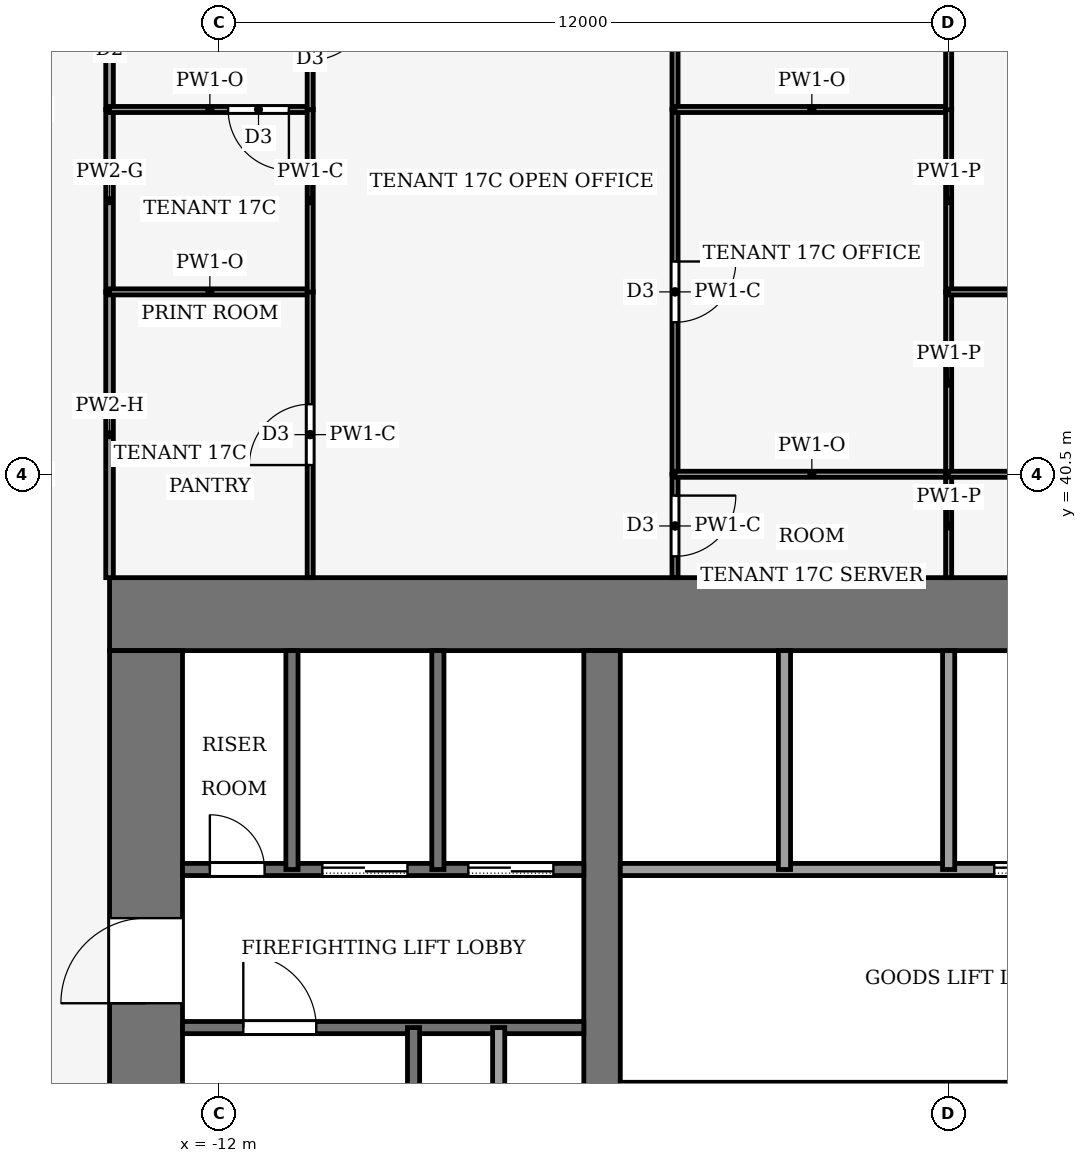
"""IFC4 building model, lengths in metres.
Left out: names, types, materials, properties, quantities, classifications, styles, units other than length and angle.
Written with IfcOpenShell. Run it as: python <this file> out.ifc"""

import sys

from ifc_helpers import new_model, si_unit, direction, frame, frame_2d, origin, place, context, subcontext, project, spatial, rectangle, extrude, element, fill, save


model = new_model("IFC4")
c1 = context("Model", 3, precision=1e-05, world=origin(), true_north=direction((0.0, 1.0)))
c2 = subcontext(c1, "Body", "Model", "MODEL_VIEW")
j1 = project(units=[si_unit("LENGTHUNIT", "METRE"), si_unit("PLANEANGLEUNIT", "RADIAN")], contexts=[c1])
p1 = place(None, origin())
s1 = spatial("IfcSite", under=j1, at=p1, CompositionType="ELEMENT")
p2 = place(p1, origin())
s2 = spatial("IfcBuilding", under=s1, at=p2, CompositionType="ELEMENT")
p3 = place(p2, frame((0.0, 0.0, 78.0)))
s3 = spatial("IfcBuildingStorey", under=s2, at=p3, CompositionType="ELEMENT", Elevation=78.0)
p4 = place(p3, frame((-13.8, 38.2, -0.13), z_axis=(0.0, 0.0, 1.0), x_axis=(1.0, 0.0, 0.0)))
e1 = element("IfcWall", 1, at=p4, inside=s3, PredefinedType="SHEAR", context=c2, shape_type="SweptSolid", body=[
    extrude(rectangle(XDim=27.6, YDim=1.2, at=frame_2d((13.8, 0.0))), origin(), (0.0, 0.0, 1.0), 4.0),
])
p5 = place(p3, frame((-13.2, 18.4, -0.13), z_axis=(0.0, 0.0, 1.0), x_axis=(0.0, 1.0, 0.0)))
e2 = element("IfcWall", 2, at=p5, inside=s3, PredefinedType="SHEAR", context=c2, shape_type="SweptSolid", body=[
    extrude(rectangle(XDim=19.2, YDim=1.2, at=frame_2d((9.6, 0.0))), origin(), (0.0, 0.0, 1.0), 4.0),
])
p6 = place(p5, frame((2.8, 0.0, 0.13)))
e3 = element("IfcOpeningElement", 3, at=p6, cuts=e2, PredefinedType="OPENING", context=c2, shape_type="SweptSolid", body=[
    extrude(rectangle(XDim=2.4, YDim=2.4, at=frame_2d((1.2, 1.2))), frame((0.0, 0.61, 0.0), z_axis=(0.0, -1.0, 0.0), x_axis=(1.0, 0.0, 0.0)), (0.0, 0.0, 1.0), 1.22),
])
p7 = place(p5, frame((13.4, 0.0, 0.13)))
e4 = element("IfcOpeningElement", 4, at=p7, cuts=e2, PredefinedType="OPENING", context=c2, shape_type="SweptSolid", body=[
    extrude(rectangle(XDim=1.4, YDim=2.2, at=frame_2d((0.7, 1.1))), frame((0.0, 0.61, 0.0), z_axis=(0.0, -1.0, 0.0), x_axis=(1.0, 0.0, 0.0)), (0.0, 0.0, 1.0), 1.22),
])
p8 = place(p3, frame((-5.7, 18.4, -0.13), z_axis=(0.0, 0.0, 1.0), x_axis=(0.0, 1.0, 0.0)))
e5 = element("IfcWall", 5, at=p8, inside=s3, PredefinedType="SHEAR", context=c2, shape_type="SweptSolid", body=[
    extrude(rectangle(XDim=19.2, YDim=0.6, at=frame_2d((9.6, 0.0))), origin(), (0.0, 0.0, 1.0), 4.0),
])
p9 = place(p8, frame((8.35, 0.0, 0.13)))
e6 = element("IfcOpeningElement", 6, at=p9, cuts=e5, PredefinedType="OPENING", context=c2, shape_type="SweptSolid", body=[
    extrude(rectangle(XDim=0.9, YDim=2.1, at=frame_2d((0.45, 1.05))), frame((0.0, 0.31, 0.0), z_axis=(0.0, -1.0, 0.0), x_axis=(1.0, 0.0, 0.0)), (0.0, 0.0, 1.0), 0.62),
])
p10 = place(p3, frame((-12.6, 31.4, 0.0), z_axis=(0.0, 0.0, 1.0), x_axis=(1.0, 0.0, 0.0)))
e7 = element("IfcWall", 7, at=p10, inside=s3, PredefinedType="PARTITIONING", context=c2, shape_type="SweptSolid", body=[
    extrude(rectangle(XDim=6.6, YDim=0.2, at=frame_2d((3.3, 0.0))), origin(), (0.0, 0.0, 1.0), 3.87),
])
p11 = place(p10, frame((1.0, 0.0, 0.0)))
e8 = element("IfcOpeningElement", 8, at=p11, cuts=e7, PredefinedType="OPENING", context=c2, shape_type="SweptSolid", body=[
    extrude(rectangle(XDim=1.2, YDim=2.2, at=frame_2d((0.6, 1.1))), frame((0.0, 0.11, 0.0), z_axis=(0.0, -1.0, 0.0), x_axis=(1.0, 0.0, 0.0)), (0.0, 0.0, 1.0), 0.22),
])
p12 = place(p3, frame((-12.6, 34.0, 0.0), z_axis=(0.0, 0.0, 1.0), x_axis=(1.0, 0.0, 0.0)))
e9 = element("IfcWall", 9, at=p12, inside=s3, PredefinedType="PARTITIONING", context=c2, shape_type="SweptSolid", body=[
    extrude(rectangle(XDim=6.6, YDim=0.2, at=frame_2d((3.3, 0.0))), origin(), (0.0, 0.0, 1.0), 3.87),
])
p13 = place(p12, frame((4.7, 0.0, 0.0)))
e10 = element("IfcOpeningElement", 10, at=p13, cuts=e9, PredefinedType="OPENING", context=c2, shape_type="SweptSolid", body=[
    extrude(rectangle(XDim=1.4, YDim=2.2, at=frame_2d((0.7, 1.1))), frame((0.0, 0.11, 0.0), z_axis=(0.0, -1.0, 0.0), x_axis=(1.0, 0.0, 0.0)), (0.0, 0.0, 1.0), 0.22),
])
p14 = place(p12, frame((2.3, 0.0, 0.0)))
e11 = element("IfcOpeningElement", 11, at=p14, cuts=e9, PredefinedType="OPENING", context=c2, shape_type="SweptSolid", body=[
    extrude(rectangle(XDim=1.4, YDim=2.2, at=frame_2d((0.7, 1.1))), frame((0.0, 0.11, 0.0), z_axis=(0.0, -1.0, 0.0), x_axis=(1.0, 0.0, 0.0)), (0.0, 0.0, 1.0), 0.22),
])
p15 = place(p12, frame((0.45, 0.0, 0.0)))
e12 = element("IfcOpeningElement", 12, at=p15, cuts=e9, PredefinedType="OPENING", context=c2, shape_type="SweptSolid", body=[
    extrude(rectangle(XDim=0.9, YDim=2.1, at=frame_2d((0.45, 1.05))), frame((0.0, 0.11, 0.0), z_axis=(0.0, -1.0, 0.0), x_axis=(1.0, 0.0, 0.0)), (0.0, 0.0, 1.0), 0.22),
])
p16 = place(p3, frame((-5.4, 34.0, 0.0), z_axis=(0.0, 0.0, 1.0), x_axis=(1.0, 0.0, 0.0)))
e13 = element("IfcWall", 13, at=p16, inside=s3, PredefinedType="PARTITIONING", context=c2, shape_type="SweptSolid", body=[
    extrude(rectangle(XDim=10.8, YDim=0.2, at=frame_2d((5.4, 0.0))), origin(), (0.0, 0.0, 1.0), 3.87),
])
p17 = place(p16, frame((6.15, 0.0, 0.0)))
e14 = element("IfcOpeningElement", 14, at=p17, cuts=e13, PredefinedType="OPENING", context=c2, shape_type="SweptSolid", body=[
    extrude(rectangle(XDim=1.2, YDim=2.2, at=frame_2d((0.6, 1.1))), frame((0.0, 0.11, 0.0), z_axis=(0.0, -1.0, 0.0), x_axis=(1.0, 0.0, 0.0)), (0.0, 0.0, 1.0), 0.22),
])
p18 = place(p16, frame((8.95, 0.0, 0.0)))
e15 = element("IfcOpeningElement", 15, at=p18, cuts=e13, PredefinedType="OPENING", context=c2, shape_type="SweptSolid", body=[
    extrude(rectangle(XDim=1.0, YDim=2.1, at=frame_2d((0.5, 1.05))), frame((0.0, 0.11, 0.0), z_axis=(0.0, -1.0, 0.0), x_axis=(1.0, 0.0, 0.0)), (0.0, 0.0, 1.0), 0.22),
])
p19 = place(p3, frame((-10.8, 34.0, 0.0), z_axis=(0.0, 0.0, 1.0), x_axis=(0.0, 1.0, 0.0)))
e16 = element("IfcWall", 16, at=p19, inside=s3, PredefinedType="PARTITIONING", context=c2, shape_type="SweptSolid", body=[
    extrude(rectangle(XDim=3.6, YDim=0.2, at=frame_2d((1.8, 0.0))), origin(), (0.0, 0.0, 1.0), 3.87),
])
p20 = place(p3, frame((-8.8, 24.0, 0.0), z_axis=(0.0, 0.0, 1.0), x_axis=(0.0, 1.0, 0.0)))
e17 = element("IfcWall", 17, at=p20, inside=s3, PredefinedType="PARTITIONING", context=c2, shape_type="SweptSolid", body=[
    extrude(rectangle(XDim=7.4, YDim=0.2, at=frame_2d((3.7, 0.0))), origin(), (0.0, 0.0, 1.0), 3.87),
])
p21 = place(p3, frame((-8.4, 34.0, 0.0), z_axis=(0.0, 0.0, 1.0), x_axis=(0.0, 1.0, 0.0)))
e18 = element("IfcWall", 18, at=p21, inside=s3, PredefinedType="PARTITIONING", context=c2, shape_type="SweptSolid", body=[
    extrude(rectangle(XDim=3.6, YDim=0.2, at=frame_2d((1.8, 0.0))), origin(), (0.0, 0.0, 1.0), 3.87),
])
p22 = place(p3, frame((-7.4, 24.0, 0.0), z_axis=(0.0, 0.0, 1.0), x_axis=(0.0, 1.0, 0.0)))
e19 = element("IfcWall", 19, at=p22, inside=s3, PredefinedType="PARTITIONING", context=c2, shape_type="SweptSolid", body=[
    extrude(rectangle(XDim=7.4, YDim=0.2, at=frame_2d((3.7, 0.0))), origin(), (0.0, 0.0, 1.0), 3.87),
])
for number, where, z_axis, x_axis in (
    (20, (-2.7, 34.0, 0.0), (0.0, 0.0, 1.0), (0.0, 1.0, 0.0)),
    (21, (0.0, 34.0, 0.0), (0.0, 0.0, 1.0), (0.0, 1.0, 0.0)),
):
    element("IfcWall", number, at=place(p3, frame(where, z_axis=z_axis, x_axis=x_axis)), inside=s3, PredefinedType="PARTITIONING", context=c2, shape_type="SweptSolid", body=[
        extrude(rectangle(XDim=3.6, YDim=0.2, at=frame_2d((1.8, 0.0))), origin(), (0.0, 0.0, 1.0), 3.87),
    ])
p23 = place(p3, frame((-13.8, 38.8, 0.0), z_axis=(0.0, 0.0, 1.0), x_axis=(0.0, 1.0, 0.0)))
e22 = element("IfcWall", 22, at=p23, inside=s3, PredefinedType="PARTITIONING", context=c2, shape_type="SweptSolid", body=[
    extrude(rectangle(XDim=4.7, YDim=0.125, at=frame_2d((2.35, 0.0))), origin(), (0.0, 0.0, 1.0), 3.14),
])
p24 = place(p3, frame((-13.8, 43.5, 0.0), z_axis=(0.0, 0.0, 1.0), x_axis=(0.0, 1.0, 0.0)))
e23 = element("IfcWall", 23, at=p24, inside=s3, PredefinedType="PARTITIONING", context=c2, shape_type="SweptSolid", body=[
    extrude(rectangle(XDim=3.0, YDim=0.125, at=frame_2d((1.5, 0.0))), origin(), (0.0, 0.0, 1.0), 3.87),
])
p25 = place(p3, frame((-13.8, 52.73, 0.0), z_axis=(0.0, 0.0, 1.0), x_axis=(0.0, -1.0, 0.0)))
e24 = element("IfcWall", 24, at=p25, inside=s3, PredefinedType="PARTITIONING", context=c2, shape_type="SweptSolid", body=[
    extrude(rectangle(XDim=6.23, YDim=0.125, at=frame_2d((3.115, 0.0))), origin(), (0.0, 0.0, 1.0), 3.04),
])
p26 = place(p25, frame((4.28, 0.0, 0.0)))
e25 = element("IfcOpeningElement", 25, at=p26, cuts=e24, PredefinedType="OPENING", context=c2, shape_type="SweptSolid", body=[
    extrude(rectangle(XDim=1.0, YDim=2.1, at=frame_2d((0.5, 1.05))), frame((0.0, 0.073, 0.0), z_axis=(0.0, -1.0, 0.0), x_axis=(1.0, 0.0, 0.0)), (0.0, 0.0, 1.0), 0.145),
])
p27 = place(p3, frame((-10.5, 43.5, 0.0), z_axis=(0.0, 0.0, 1.0), x_axis=(-1.0, 0.0, 0.0)))
e26 = element("IfcWall", 26, at=p27, inside=s3, PredefinedType="PARTITIONING", context=c2, shape_type="SweptSolid", body=[
    extrude(rectangle(XDim=3.3, YDim=0.1, at=frame_2d((1.65, 0.0))), origin(), (0.0, 0.0, 1.0), 3.39),
])
p28 = place(p3, frame((-10.5, 38.8, 0.0), z_axis=(0.0, 0.0, 1.0), x_axis=(0.0, 1.0, 0.0)))
e27 = element("IfcWall", 27, at=p28, inside=s3, PredefinedType="PARTITIONING", context=c2, shape_type="SweptSolid", body=[
    extrude(rectangle(XDim=4.704, YDim=0.1, at=frame_2d((2.352, 0.0))), origin(), (0.0, 0.0, 1.0), 3.87),
])
p29 = place(p28, frame((1.852, 0.0, 0.0)))
e28 = element("IfcOpeningElement", 28, at=p29, cuts=e27, PredefinedType="OPENING", context=c2, shape_type="SweptSolid", body=[
    extrude(rectangle(XDim=1.0, YDim=2.1, at=frame_2d((0.5, 1.05))), frame((0.0, 0.06, 0.0), z_axis=(0.0, -1.0, 0.0), x_axis=(1.0, 0.0, 0.0)), (0.0, 0.0, 1.0), 0.12),
])
p30 = place(p3, frame((-10.5, 46.5, 0.0), z_axis=(0.0, 0.0, 1.0), x_axis=(-1.0, 0.0, 0.0)))
e29 = element("IfcWall", 29, at=p30, inside=s3, PredefinedType="PARTITIONING", context=c2, shape_type="SweptSolid", body=[
    extrude(rectangle(XDim=3.3, YDim=0.1, at=frame_2d((1.65, 0.0))), origin(), (0.0, 0.0, 1.0), 3.39),
])
p31 = place(p30, frame((0.35, 0.0, 0.0)))
e30 = element("IfcOpeningElement", 30, at=p31, cuts=e29, PredefinedType="OPENING", context=c2, shape_type="SweptSolid", body=[
    extrude(rectangle(XDim=1.0, YDim=2.1, at=frame_2d((0.5, 1.05))), frame((0.0, 0.06, 0.0), z_axis=(0.0, -1.0, 0.0), x_axis=(1.0, 0.0, 0.0)), (0.0, 0.0, 1.0), 0.12),
])
p32 = place(p3, frame((-10.5, 43.496, 0.0), z_axis=(0.0, 0.0, 1.0), x_axis=(0.0, 1.0, 0.0)))
e31 = element("IfcWall", 31, at=p32, inside=s3, PredefinedType="PARTITIONING", context=c2, shape_type="SweptSolid", body=[
    extrude(rectangle(XDim=3.008, YDim=0.1, at=frame_2d((1.504, 0.0))), origin(), (0.0, 0.0, 1.0), 3.87),
])
p33 = place(p3, frame((-10.5, 52.455, 0.0), z_axis=(0.0, 0.0, 1.0), x_axis=(0.0, -1.0, 0.0)))
e32 = element("IfcWall", 32, at=p33, inside=s3, PredefinedType="PARTITIONING", context=c2, shape_type="SweptSolid", body=[
    extrude(rectangle(XDim=5.959, YDim=0.1, at=frame_2d((2.979, 0.0))), origin(), (0.0, 0.0, 1.0), 3.04),
])
p34 = place(p33, frame((4.145, 0.0, 0.0)))
e33 = element("IfcOpeningElement", 33, at=p34, cuts=e32, PredefinedType="OPENING", context=c2, shape_type="SweptSolid", body=[
    extrude(rectangle(XDim=1.0, YDim=2.1, at=frame_2d((0.5, 1.05))), frame((0.0, 0.06, 0.0), z_axis=(0.0, -1.0, 0.0), x_axis=(1.0, 0.0, 0.0)), (0.0, 0.0, 1.0), 0.12),
])
p35 = place(p3, frame((-4.5, 40.5, 0.0), z_axis=(0.0, 0.0, 1.0), x_axis=(0.0, -1.0, 0.0)))
e34 = element("IfcWall", 34, at=p35, inside=s3, PredefinedType="PARTITIONING", context=c2, shape_type="SweptSolid", body=[
    extrude(rectangle(XDim=1.7, YDim=0.1, at=frame_2d((0.85, 0.0))), origin(), (0.0, 0.0, 1.0), 3.87),
])
p36 = place(p35, frame((0.35, 0.0, 0.0)))
e35 = element("IfcOpeningElement", 35, at=p36, cuts=e34, PredefinedType="OPENING", context=c2, shape_type="SweptSolid", body=[
    extrude(rectangle(XDim=1.0, YDim=2.1, at=frame_2d((0.5, 1.05))), frame((0.0, 0.06, 0.0), z_axis=(0.0, -1.0, 0.0), x_axis=(1.0, 0.0, 0.0)), (0.0, 0.0, 1.0), 0.12),
])
p37 = place(p3, frame((-4.5, 46.5, 0.0), z_axis=(0.0, 0.0, 1.0), x_axis=(0.0, -1.0, 0.0)))
e36 = element("IfcWall", 36, at=p37, inside=s3, PredefinedType="PARTITIONING", context=c2, shape_type="SweptSolid", body=[
    extrude(rectangle(XDim=6.0, YDim=0.1, at=frame_2d((3.0, 0.0))), origin(), (0.0, 0.0, 1.0), 3.87),
])
p38 = place(p37, frame((2.5, 0.0, 0.0)))
e37 = element("IfcOpeningElement", 37, at=p38, cuts=e36, PredefinedType="OPENING", context=c2, shape_type="SweptSolid", body=[
    extrude(rectangle(XDim=1.0, YDim=2.1, at=frame_2d((0.5, 1.05))), frame((0.0, 0.06, 0.0), z_axis=(0.0, -1.0, 0.0), x_axis=(1.0, 0.0, 0.0)), (0.0, 0.0, 1.0), 0.12),
])
p39 = place(p3, frame((-4.5, 51.955, 0.0), z_axis=(0.0, 0.0, 1.0), x_axis=(0.0, -1.0, 0.0)))
e38 = element("IfcWall", 38, at=p39, inside=s3, PredefinedType="PARTITIONING", context=c2, shape_type="SweptSolid", body=[
    extrude(rectangle(XDim=5.455, YDim=0.1, at=frame_2d((2.728, 0.0))), origin(), (0.0, 0.0, 1.0), 3.04),
])
p40 = place(p39, frame((2.292, 0.0, 0.0)))
e39 = element("IfcOpeningElement", 39, at=p40, cuts=e38, PredefinedType="OPENING", context=c2, shape_type="SweptSolid", body=[
    extrude(rectangle(XDim=1.0, YDim=2.1, at=frame_2d((0.5, 1.05))), frame((0.0, 0.06, 0.0), z_axis=(0.0, -1.0, 0.0), x_axis=(1.0, 0.0, 0.0)), (0.0, 0.0, 1.0), 0.12),
])
p41 = place(p3, frame((0.0, 40.5, 0.0), z_axis=(0.0, 0.0, 1.0), x_axis=(-1.0, 0.0, 0.0)))
e40 = element("IfcWall", 40, at=p41, inside=s3, PredefinedType="PARTITIONING", context=c2, shape_type="SweptSolid", body=[
    extrude(rectangle(XDim=4.5, YDim=0.1, at=frame_2d((2.25, 0.0))), origin(), (0.0, 0.0, 1.0), 3.39),
])
p42 = place(p3, frame((0.0, 38.8, 0.0), z_axis=(0.0, 0.0, 1.0), x_axis=(0.0, 1.0, 0.0)))
e41 = element("IfcWall", 41, at=p42, inside=s3, PredefinedType="PARTITIONING", context=c2, shape_type="SweptSolid", body=[
    extrude(rectangle(XDim=1.7, YDim=0.1, at=frame_2d((0.85, 0.0))), origin(), (0.0, 0.0, 1.0), 3.44),
])
p43 = place(p3, frame((0.0, 46.5, 0.0), z_axis=(0.0, 0.0, 1.0), x_axis=(-1.0, 0.0, 0.0)))
e42 = element("IfcWall", 42, at=p43, inside=s3, PredefinedType="PARTITIONING", context=c2, shape_type="SweptSolid", body=[
    extrude(rectangle(XDim=4.5, YDim=0.1, at=frame_2d((2.25, 0.0))), origin(), (0.0, 0.0, 1.0), 3.39),
])
p44 = place(p3, frame((0.0, 40.5, 0.0), z_axis=(0.0, 0.0, 1.0), x_axis=(0.0, 1.0, 0.0)))
e43 = element("IfcWall", 43, at=p44, inside=s3, PredefinedType="PARTITIONING", context=c2, shape_type="SweptSolid", body=[
    extrude(rectangle(XDim=3.0, YDim=0.1, at=frame_2d((1.5, 0.0))), origin(), (0.0, 0.0, 1.0), 3.44),
])
p45 = place(p3, frame((0.0, 43.5, 0.0), z_axis=(0.0, 0.0, 1.0), x_axis=(0.0, 1.0, 0.0)))
e44 = element("IfcWall", 44, at=p45, inside=s3, PredefinedType="PARTITIONING", context=c2, shape_type="SweptSolid", body=[
    extrude(rectangle(XDim=3.004, YDim=0.1, at=frame_2d((1.502, 0.0))), origin(), (0.0, 0.0, 1.0), 3.44),
])
p46 = place(p3, frame((0.0, 46.496, 0.0), z_axis=(0.0, 0.0, 1.0), x_axis=(0.0, 1.0, 0.0)))
e45 = element("IfcWall", 45, at=p46, inside=s3, PredefinedType="PARTITIONING", context=c2, shape_type="SweptSolid", body=[
    extrude(rectangle(XDim=5.084, YDim=0.1, at=frame_2d((2.542, 0.0))), origin(), (0.0, 0.0, 1.0), 3.04),
])
p47 = place(p3, frame((7.5, 40.5, 0.0), z_axis=(0.0, 0.0, 1.0), x_axis=(-1.0, 0.0, 0.0)))
e46 = element("IfcWall", 46, at=p47, inside=s3, PredefinedType="PARTITIONING", context=c2, shape_type="SweptSolid", body=[
    extrude(rectangle(XDim=7.5, YDim=0.1, at=frame_2d((3.75, 0.0))), origin(), (0.0, 0.0, 1.0), 3.39),
])
p48 = place(p3, frame((0.0, 43.5, 0.0), z_axis=(0.0, 0.0, 1.0), x_axis=(1.0, 0.0, 0.0)))
e47 = element("IfcWall", 47, at=p48, inside=s3, PredefinedType="PARTITIONING", context=c2, shape_type="SweptSolid", body=[
    extrude(rectangle(XDim=7.5, YDim=0.1, at=frame_2d((3.75, 0.0))), origin(), (0.0, 0.0, 1.0), 3.39),
])
p49 = place(p48, frame((3.25, 0.0, 0.0)))
e48 = element("IfcOpeningElement", 48, at=p49, cuts=e47, PredefinedType="OPENING", context=c2, shape_type="SweptSolid", body=[
    extrude(rectangle(XDim=1.0, YDim=2.1, at=frame_2d((0.5, 1.05))), frame((0.0, 0.06, 0.0), z_axis=(0.0, -1.0, 0.0), x_axis=(1.0, 0.0, 0.0)), (0.0, 0.0, 1.0), 0.12),
])
p50 = place(p17, origin())
e49 = element("IfcDoor", 49, at=p50, inside=s3, OperationType="SLIDING_TO_LEFT", PredefinedType="DOOR", context=c2, shape_type="SweptSolid", body=[
    extrude(rectangle(XDim=1.2, YDim=2.2, at=frame_2d((0.6, 1.1))), frame((0.0, 0.025, 0.0), z_axis=(0.0, -1.0, 0.0), x_axis=(1.0, 0.0, 0.0)), (0.0, 0.0, 1.0), 0.05),
])
fill(e14, e49)
p51 = place(p13, origin())
e50 = element("IfcDoor", 50, at=p51, inside=s3, OperationType="SLIDING_TO_LEFT", PredefinedType="DOOR", context=c2, shape_type="SweptSolid", body=[
    extrude(rectangle(XDim=1.4, YDim=2.2, at=frame_2d((0.7, 1.1))), frame((0.0, 0.025, 0.0), z_axis=(0.0, -1.0, 0.0), x_axis=(1.0, 0.0, 0.0)), (0.0, 0.0, 1.0), 0.05),
])
fill(e10, e50)
p52 = place(p14, origin())
e51 = element("IfcDoor", 51, at=p52, inside=s3, OperationType="SLIDING_TO_LEFT", PredefinedType="DOOR", context=c2, shape_type="SweptSolid", body=[
    extrude(rectangle(XDim=1.4, YDim=2.2, at=frame_2d((0.7, 1.1))), frame((0.0, 0.025, 0.0), z_axis=(0.0, -1.0, 0.0), x_axis=(1.0, 0.0, 0.0)), (0.0, 0.0, 1.0), 0.05),
])
fill(e11, e51)
p53 = place(p15, origin())
e52 = element("IfcDoor", 52, at=p53, inside=s3, OperationType="SINGLE_SWING_RIGHT", PredefinedType="DOOR", context=c2, shape_type="SweptSolid", body=[
    extrude(rectangle(XDim=0.9, YDim=2.1, at=frame_2d((0.45, 1.05))), frame((0.0, 0.025, 0.0), z_axis=(0.0, -1.0, 0.0), x_axis=(1.0, 0.0, 0.0)), (0.0, 0.0, 1.0), 0.05),
])
fill(e12, e52)
p54 = place(p11, origin())
e53 = element("IfcDoor", 53, at=p54, inside=s3, OperationType="SINGLE_SWING_RIGHT", PredefinedType="DOOR", context=c2, shape_type="SweptSolid", body=[
    extrude(rectangle(XDim=1.2, YDim=2.2, at=frame_2d((0.6, 1.1))), frame((0.0, 0.025, 0.0), z_axis=(0.0, -1.0, 0.0), x_axis=(1.0, 0.0, 0.0)), (0.0, 0.0, 1.0), 0.05),
])
fill(e8, e53)
p55 = place(p7, origin())
e54 = element("IfcDoor", 54, at=p55, inside=s3, OperationType="SINGLE_SWING_RIGHT", PredefinedType="DOOR", context=c2, shape_type="SweptSolid", body=[
    extrude(rectangle(XDim=1.4, YDim=2.2, at=frame_2d((0.7, 1.1))), frame((0.0, 0.025, 0.0), z_axis=(0.0, -1.0, 0.0), x_axis=(1.0, 0.0, 0.0)), (0.0, 0.0, 1.0), 0.05),
])
fill(e4, e54)
p56 = place(p29, origin())
e55 = element("IfcDoor", 55, at=p56, inside=s3, OperationType="SINGLE_SWING_RIGHT", PredefinedType="DOOR", context=c2, shape_type="SweptSolid", body=[
    extrude(rectangle(XDim=1.0, YDim=2.1, at=frame_2d((0.5, 1.05))), frame((0.0, 0.025, 0.0), z_axis=(0.0, -1.0, 0.0), x_axis=(1.0, 0.0, 0.0)), (0.0, 0.0, 1.0), 0.05),
])
fill(e28, e55)
p57 = place(p31, origin())
e56 = element("IfcDoor", 56, at=p57, inside=s3, OperationType="SINGLE_SWING_LEFT", PredefinedType="DOOR", context=c2, shape_type="SweptSolid", body=[
    extrude(rectangle(XDim=1.0, YDim=2.1, at=frame_2d((0.5, 1.05))), frame((0.0, 0.025, 0.0), z_axis=(0.0, -1.0, 0.0), x_axis=(1.0, 0.0, 0.0)), (0.0, 0.0, 1.0), 0.05),
])
fill(e30, e56)
p58 = place(p34, origin())
e57 = element("IfcDoor", 57, at=p58, inside=s3, OperationType="SINGLE_SWING_RIGHT", PredefinedType="DOOR", context=c2, shape_type="SweptSolid", body=[
    extrude(rectangle(XDim=1.0, YDim=2.1, at=frame_2d((0.5, 1.05))), frame((0.0, 0.025, 0.0), z_axis=(0.0, -1.0, 0.0), x_axis=(1.0, 0.0, 0.0)), (0.0, 0.0, 1.0), 0.05),
])
fill(e33, e57)
p59 = place(p36, origin())
e58 = element("IfcDoor", 58, at=p59, inside=s3, OperationType="SINGLE_SWING_LEFT", PredefinedType="DOOR", context=c2, shape_type="SweptSolid", body=[
    extrude(rectangle(XDim=1.0, YDim=2.1, at=frame_2d((0.5, 1.05))), frame((0.0, 0.025, 0.0), z_axis=(0.0, -1.0, 0.0), x_axis=(1.0, 0.0, 0.0)), (0.0, 0.0, 1.0), 0.05),
])
fill(e35, e58)
p60 = place(p38, origin())
e59 = element("IfcDoor", 59, at=p60, inside=s3, OperationType="SINGLE_SWING_RIGHT", PredefinedType="DOOR", context=c2, shape_type="SweptSolid", body=[
    extrude(rectangle(XDim=1.0, YDim=2.1, at=frame_2d((0.5, 1.05))), frame((0.0, 0.025, 0.0), z_axis=(0.0, -1.0, 0.0), x_axis=(1.0, 0.0, 0.0)), (0.0, 0.0, 1.0), 0.05),
])
fill(e37, e59)
save(model, sys.argv[1])
